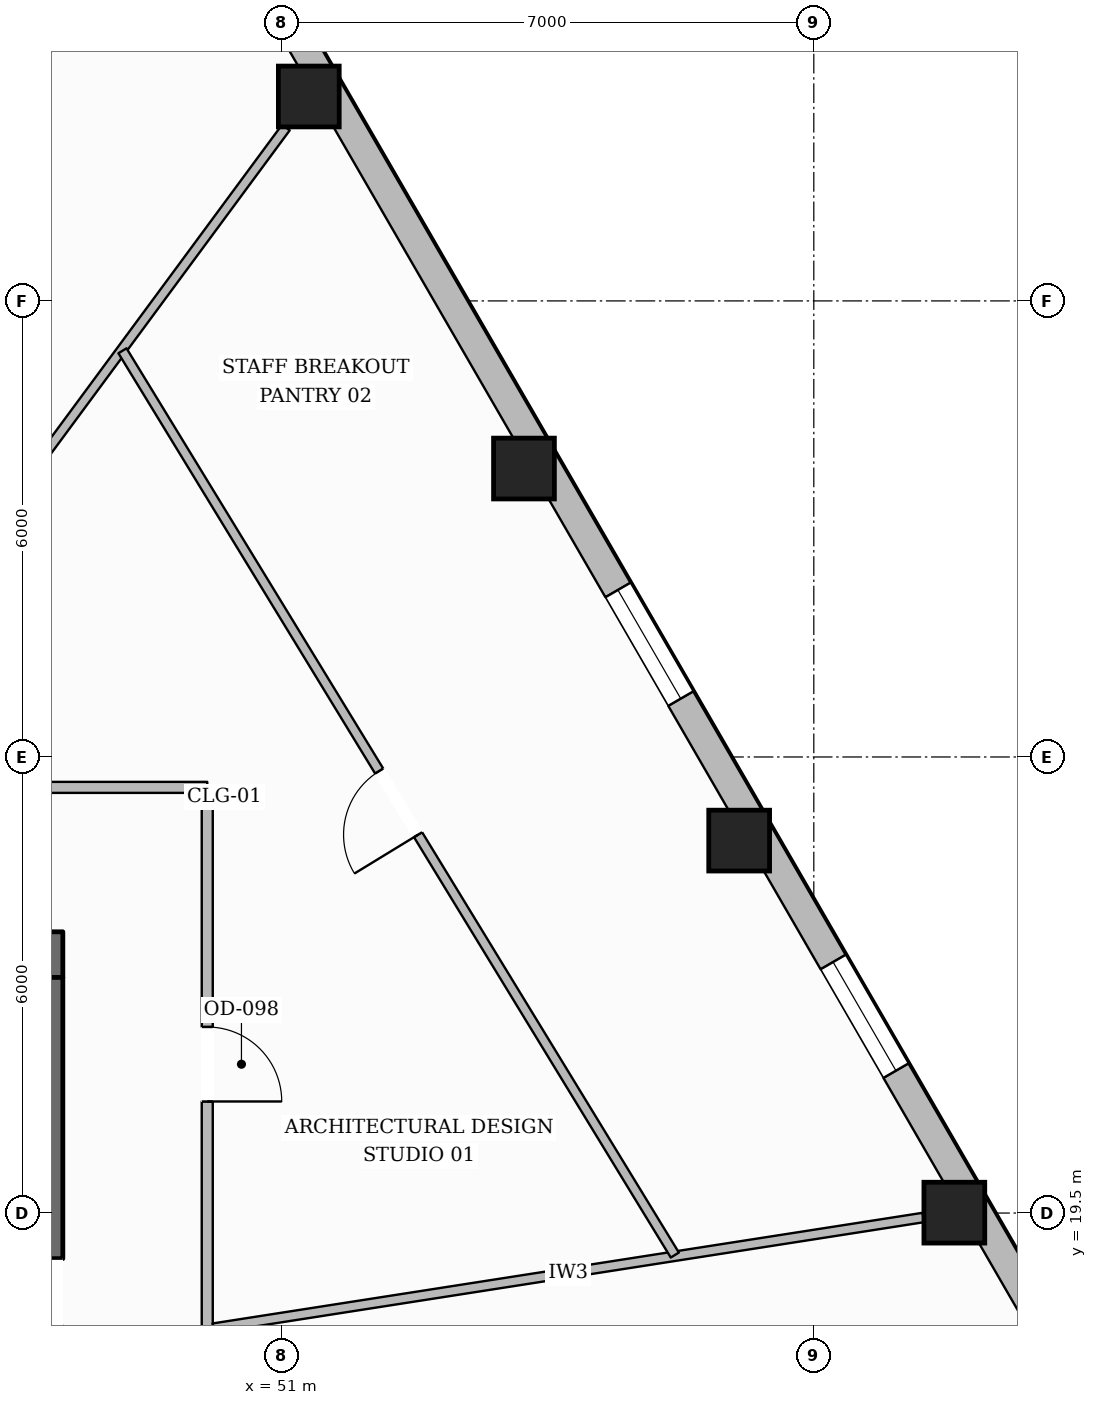
"""IFC4 building model, lengths in metres.
Left out: names, types, materials, properties, quantities, classifications, styles, units other than length and angle.
Written with IfcOpenShell. Run it as: python <this file> out.ifc"""

import sys

from ifc_helpers import new_model, si_unit, direction, frame, frame_2d, origin, origin_2d, place, context, subcontext, project, spatial, rectangle, hollow_rectangle, extrude, element, fill, save


model = new_model("IFC4")
c1 = context("Model", 3, precision=1e-05, world=origin(), true_north=direction((0.0, 1.0)))
c2 = subcontext(c1, "Body", "Model", "MODEL_VIEW")
j1 = project(units=[si_unit("LENGTHUNIT", "METRE"), si_unit("PLANEANGLEUNIT", "RADIAN")], contexts=[c1])
p1 = place(None, origin())
s1 = spatial("IfcSite", under=j1, at=p1, CompositionType="ELEMENT")
p2 = place(p1, origin())
s2 = spatial("IfcBuilding", under=s1, at=p2, CompositionType="ELEMENT")
p3 = place(p2, frame((0.0, 0.0, 40.65)))
s3 = spatial("IfcBuildingStorey", under=s2, at=p3, CompositionType="ELEMENT", Elevation=40.65)
p4 = place(p3, frame((27.88, 22.9, 0.0), z_axis=(0.0, 0.0, 1.0), x_axis=(1.0, 0.0, 0.0)))
e1 = element("IfcWall", 1, at=p4, inside=s3, PredefinedType="SOLIDWALL", context=c2, shape_type="SweptSolid", body=[
    extrude(rectangle(XDim=20.24, YDim=0.6, at=frame_2d((10.12, 0.0))), origin(), (0.0, 0.0, 1.0), 3.59),
])
p5 = place(p4, frame((6.395, 0.0, 0.0)))
e2 = element("IfcOpeningElement", 2, at=p5, cuts=e1, PredefinedType="OPENING", context=c2, shape_type="SweptSolid", body=[
    extrude(rectangle(XDim=1.05, YDim=2.15, at=frame_2d((0.525, 1.075))), frame((0.0, 0.31, 0.0), z_axis=(0.0, -1.0, 0.0), x_axis=(1.0, 0.0, 0.0)), (0.0, 0.0, 1.0), 0.62),
])
p6 = place(p4, frame((12.795, 0.0, 0.0)))
e3 = element("IfcOpeningElement", 3, at=p6, cuts=e1, PredefinedType="OPENING", context=c2, shape_type="SweptSolid", body=[
    extrude(rectangle(XDim=1.05, YDim=2.15, at=frame_2d((0.525, 1.075))), frame((0.0, 0.31, 0.0), z_axis=(0.0, -1.0, 0.0), x_axis=(1.0, 0.0, 0.0)), (0.0, 0.0, 1.0), 0.62),
])
p7 = place(p3, frame((47.82, 9.6, 0.0), z_axis=(0.0, 0.0, 1.0), x_axis=(0.0, 1.0, 0.0)))
e4 = element("IfcWall", 4, at=p7, inside=s3, PredefinedType="SOLIDWALL", context=c2, shape_type="SweptSolid", body=[
    extrude(rectangle(XDim=13.0, YDim=0.6, at=frame_2d((6.5, 0.0))), origin(), (0.0, 0.0, 1.0), 3.59),
])
p8 = place(p7, frame((0.2, 0.0, 0.0)))
e5 = element("IfcOpeningElement", 5, at=p8, cuts=e4, PredefinedType="OPENING", context=c2, shape_type="SweptSolid", body=[
    extrude(rectangle(XDim=1.1, YDim=2.15, at=frame_2d((0.55, 1.075))), frame((0.0, 0.31, 0.0), z_axis=(0.0, -1.0, 0.0), x_axis=(1.0, 0.0, 0.0)), (0.0, 0.0, 1.0), 0.62),
])
p9 = place(p7, frame((8.4, 0.0, 0.0)))
e6 = element("IfcOpeningElement", 6, at=p9, cuts=e4, PredefinedType="OPENING", context=c2, shape_type="SweptSolid", body=[
    extrude(rectangle(XDim=0.9, YDim=2.1, at=frame_2d((0.45, 1.05))), frame((0.0, 0.31, 0.0), z_axis=(0.0, -1.0, 0.0), x_axis=(1.0, 0.0, 0.0)), (0.0, 0.0, 1.0), 0.62),
])
for number, where, z_axis, x_axis in (
    (7, (59.849, 19.505, 0.0), (0.0, 0.0, 1.0), (1.0, 0.0, 0.0)),
    (8, (57.018, 24.4, 0.0), (0.0, 0.0, 1.0), (1.0, 0.0, 0.0)),
    (9, (54.187, 29.295, 0.0), (0.0, 0.0, 1.0), (1.0, 0.0, 0.0)),
    (10, (51.356, 34.189, 0.0), (0.0, 0.0, 1.0), (1.0, 0.0, 0.0)),
):
    element("IfcColumn", number, at=place(p3, frame(where, z_axis=z_axis, x_axis=x_axis)), inside=s3, PredefinedType="COLUMN", context=c2, shape_type="SweptSolid", body=[
        extrude(hollow_rectangle(XDim=0.8, YDim=0.8, WallThickness=0.036, at=origin_2d()), origin(), (0.0, 0.0, 1.0), 3.59),
    ])
p10 = place(p3, frame((45.69, 44.525, 0.0), z_axis=(0.0, 0.0, 1.0), x_axis=(0.500663446356, -0.865642023866, 0.0)))
e11 = element("IfcWall", 11, at=p10, inside=s3, PredefinedType="STANDARD", context=c2, shape_type="SweptSolid", body=[
    extrude(rectangle(XDim=34.878, YDim=0.38, at=frame_2d((17.439, 0.0))), origin(), (0.0, 0.0, 1.0), 2.97),
])
p11 = place(p10, frame((8.319, 0.0, 0.0)))
e12 = element("IfcOpeningElement", 12, at=p11, cuts=e11, PredefinedType="OPENING", context=c2, shape_type="SweptSolid", body=[
    extrude(rectangle(XDim=1.0, YDim=2.2, at=frame_2d((0.5, 1.1))), frame((0.0, 0.2, 0.0), z_axis=(0.0, -1.0, 0.0), x_axis=(1.0, 0.0, 0.0)), (0.0, 0.0, 1.0), 0.4),
])
p12 = place(p10, frame((30.75, 0.0, 0.65)))
e13 = element("IfcOpeningElement", 13, at=p12, cuts=e11, PredefinedType="OPENING", context=c2, shape_type="SweptSolid", body=[
    extrude(rectangle(XDim=1.65, YDim=1.75, at=frame_2d((0.825, 0.875))), frame((0.0, 0.2, 0.0), z_axis=(0.0, -1.0, 0.0), x_axis=(1.0, 0.0, 0.0)), (0.0, 0.0, 1.0), 0.4),
])
p13 = place(p10, frame((25.095, 0.0, 0.65)))
e14 = element("IfcOpeningElement", 14, at=p13, cuts=e11, PredefinedType="OPENING", context=c2, shape_type="SweptSolid", body=[
    extrude(rectangle(XDim=1.65, YDim=1.75, at=frame_2d((0.825, 0.875))), frame((0.0, 0.2, 0.0), z_axis=(0.0, -1.0, 0.0), x_axis=(1.0, 0.0, 0.0)), (0.0, 0.0, 1.0), 0.4),
])
p14 = place(p10, frame((19.441, 0.0, 0.65)))
e15 = element("IfcOpeningElement", 15, at=p14, cuts=e11, PredefinedType="OPENING", context=c2, shape_type="SweptSolid", body=[
    extrude(rectangle(XDim=1.65, YDim=1.75, at=frame_2d((0.825, 0.875))), frame((0.0, 0.2, 0.0), z_axis=(0.0, -1.0, 0.0), x_axis=(1.0, 0.0, 0.0)), (0.0, 0.0, 1.0), 0.4),
])
p15 = place(p10, frame((2.477, 0.0, 0.65)))
e16 = element("IfcOpeningElement", 16, at=p15, cuts=e11, PredefinedType="OPENING", context=c2, shape_type="SweptSolid", body=[
    extrude(rectangle(XDim=1.65, YDim=1.75, at=frame_2d((0.825, 0.875))), frame((0.0, 0.2, 0.0), z_axis=(0.0, -1.0, 0.0), x_axis=(1.0, 0.0, 0.0)), (0.0, 0.0, 1.0), 0.4),
])
p16 = place(p3, frame((39.0, 25.1, 0.0), z_axis=(0.0, 0.0, 1.0), x_axis=(1.0, 0.0, 0.0)))
e17 = element("IfcWall", 17, at=p16, inside=s3, PredefinedType="PARTITIONING", context=c2, shape_type="SweptSolid", body=[
    extrude(rectangle(XDim=11.02, YDim=0.145, at=frame_2d((5.51, 0.0))), origin(), (0.0, 0.0, 1.0), 3.59),
])
p17 = place(p3, frame((50.02, 25.1, 0.0), z_axis=(0.0, 0.0, 1.0), x_axis=(0.0, -1.0, 0.0)))
e18 = element("IfcWall", 18, at=p17, inside=s3, PredefinedType="PARTITIONING", context=c2, shape_type="SweptSolid", body=[
    extrude(rectangle(XDim=16.0, YDim=0.145, at=frame_2d((8.0, 0.0))), origin(), (0.0, 0.0, 1.0), 3.278),
])
p18 = place(p17, frame((3.152, 0.0, 0.0)))
e19 = element("IfcOpeningElement", 19, at=p18, cuts=e18, PredefinedType="OPENING", context=c2, shape_type="SweptSolid", body=[
    extrude(rectangle(XDim=0.98, YDim=2.15, at=frame_2d((0.49, 1.075))), frame((0.0, 0.083, 0.0), z_axis=(0.0, -1.0, 0.0), x_axis=(1.0, 0.0, 0.0)), (0.0, 0.0, 1.0), 0.165),
])
p19 = place(p3, frame((50.101, 17.986, 0.0), z_axis=(0.0, 0.0, 1.0), x_axis=(0.988074242468, 0.153978217199, 0.0)))
e20 = element("IfcWall", 20, at=p19, inside=s3, PredefinedType="PARTITIONING", context=c2, shape_type="SweptSolid", body=[
    extrude(rectangle(XDim=9.453, YDim=0.125, at=frame_2d((4.727, 0.0))), origin(), (0.0, 0.0, 1.0), 3.057),
])
p20 = place(p3, frame((44.704, 25.18, 0.0), z_axis=(0.0, 0.0, 1.0), x_axis=(0.593980052091, 0.804479768371, 0.0)))
e21 = element("IfcWall", 21, at=p20, inside=s3, PredefinedType="PARTITIONING", context=c2, shape_type="SweptSolid", body=[
    extrude(rectangle(XDim=10.691, YDim=0.125, at=frame_2d((5.346, 0.0))), origin(), (0.0, 0.0, 1.0), 3.057),
])
p21 = place(p3, frame((56.171, 18.947, 0.0), z_axis=(0.0, 0.0, 1.0), x_axis=(-0.521265818692, 0.853394367373, 0.0)))
e22 = element("IfcWall", 22, at=p21, inside=s3, PredefinedType="PARTITIONING", context=c2, shape_type="SweptSolid", body=[
    extrude(rectangle(XDim=13.941, YDim=0.125, at=frame_2d((6.97, 0.0))), origin(), (0.0, 0.0, 1.0), 3.59),
])
p22 = place(p21, frame((6.481, 0.0, 0.0)))
e23 = element("IfcOpeningElement", 23, at=p22, cuts=e22, PredefinedType="OPENING", context=c2, shape_type="SweptSolid", body=[
    extrude(rectangle(XDim=0.98, YDim=2.15, at=frame_2d((0.49, 1.075))), frame((0.0, 0.073, 0.0), z_axis=(0.0, -1.0, 0.0), x_axis=(1.0, 0.0, 0.0)), (0.0, 0.0, 1.0), 0.145),
])
p23 = place(p13, origin())
e24 = element("IfcWindow", 24, at=p23, inside=s3, PartitioningType="SINGLE_PANEL", PredefinedType="WINDOW", context=c2, shape_type="SweptSolid", body=[
    extrude(rectangle(XDim=1.65, YDim=1.75, at=frame_2d((0.825, 0.875))), frame((0.0, 0.03, 0.0), z_axis=(0.0, -1.0, 0.0), x_axis=(1.0, 0.0, 0.0)), (0.0, 0.0, 1.0), 0.06),
])
fill(e14, e24)
p24 = place(p14, origin())
e25 = element("IfcWindow", 25, at=p24, inside=s3, PartitioningType="SINGLE_PANEL", PredefinedType="WINDOW", context=c2, shape_type="SweptSolid", body=[
    extrude(rectangle(XDim=1.65, YDim=1.75, at=frame_2d((0.825, 0.875))), frame((0.0, 0.03, 0.0), z_axis=(0.0, -1.0, 0.0), x_axis=(1.0, 0.0, 0.0)), (0.0, 0.0, 1.0), 0.06),
])
fill(e15, e25)
p25 = place(p18, origin())
e26 = element("IfcDoor", 26, at=p25, inside=s3, OperationType="SINGLE_SWING_RIGHT", PredefinedType="DOOR", context=c2, shape_type="SweptSolid", body=[
    extrude(rectangle(XDim=0.98, YDim=2.15, at=frame_2d((0.49, 1.075))), frame((0.0, 0.025, 0.0), z_axis=(0.0, -1.0, 0.0), x_axis=(1.0, 0.0, 0.0)), (0.0, 0.0, 1.0), 0.05),
])
fill(e19, e26)
p26 = place(p22, origin())
e27 = element("IfcDoor", 27, at=p26, inside=s3, OperationType="SINGLE_SWING_LEFT", PredefinedType="DOOR", context=c2, shape_type="SweptSolid", body=[
    extrude(rectangle(XDim=0.98, YDim=2.15, at=frame_2d((0.49, 1.075))), frame((0.0, 0.025, 0.0), z_axis=(0.0, -1.0, 0.0), x_axis=(1.0, 0.0, 0.0)), (0.0, 0.0, 1.0), 0.05),
])
fill(e23, e27)
save(model, sys.argv[1])
